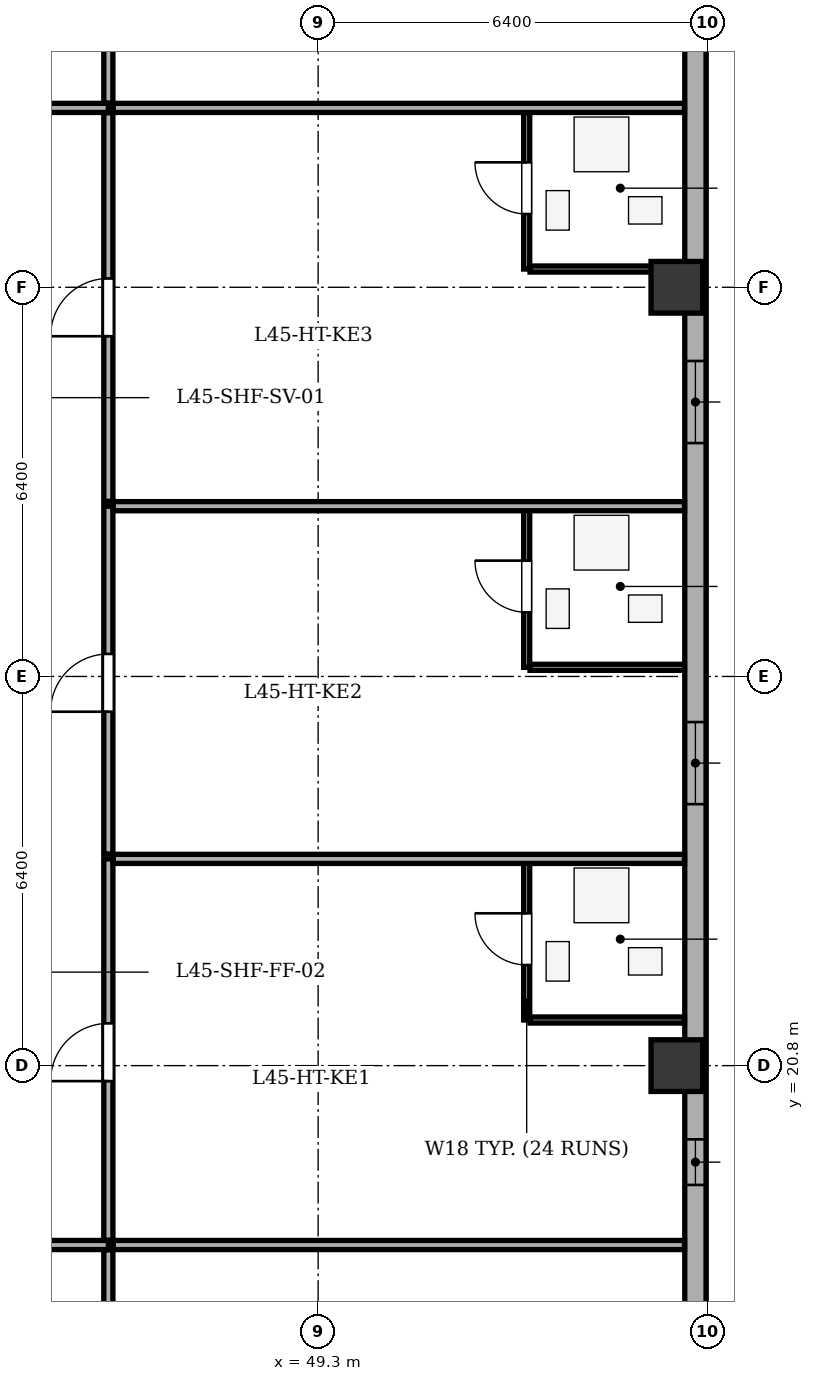
"""IFC4 building model, lengths in metres.
Left out: names, types, materials, properties, quantities, classifications, styles, units other than length and angle.
Written with IfcOpenShell. Run it as: python <this file> out.ifc"""

import sys

from ifc_helpers import new_model, si_unit, direction, frame, frame_2d, origin, origin_2d, place, context, subcontext, project, spatial, rectangle, extrude, element, fill, save


model = new_model("IFC4")
c1 = context("Model", 3, precision=1e-05, world=origin(), true_north=direction((0.0, 1.0)))
c2 = subcontext(c1, "Body", "Model", "MODEL_VIEW")
j1 = project(units=[si_unit("LENGTHUNIT", "METRE"), si_unit("PLANEANGLEUNIT", "RADIAN")], contexts=[c1])
p1 = place(None, origin())
s1 = spatial("IfcSite", under=j1, at=p1, CompositionType="ELEMENT")
p2 = place(p1, origin())
s2 = spatial("IfcBuilding", under=s1, at=p2, CompositionType="ELEMENT")
p3 = place(p2, frame((0.0, 0.0, 176.3)))
s3 = spatial("IfcBuildingStorey", under=s2, at=p3, CompositionType="ELEMENT", Elevation=176.3)
for number, where, z_axis, x_axis in (
    (1, (55.2, 20.8, 0.0), (0.0, 0.0, 1.0), (1.0, 0.0, 0.0)),
    (2, (55.2, 33.6, 0.0), (0.0, 0.0, 1.0), (1.0, 0.0, 0.0)),
):
    element("IfcColumn", number, at=place(p3, frame(where, z_axis=z_axis, x_axis=x_axis)), inside=s3, PredefinedType="COLUMN", context=c2, shape_type="SweptSolid", body=[
        extrude(rectangle(XDim=0.85, YDim=0.85, at=origin_2d()), origin(), (0.0, 0.0, 1.0), 3.5),
    ])
p4 = place(p3, frame((55.505, 47.9, 0.0), z_axis=(0.0, 0.0, 1.0), x_axis=(0.0, -1.0, 0.0)))
e3 = element("IfcWall", 3, at=p4, inside=s3, PredefinedType="STANDARD", context=c2, shape_type="SweptSolid", body=[
    extrude(rectangle(XDim=35.0, YDim=0.35, at=frame_2d((17.5, 0.0))), origin(), (0.0, 0.0, 1.0), 2.785),
])
p5 = place(p4, frame((2.595, 0.0, 0.75)))
e4 = element("IfcOpeningElement", 4, at=p5, cuts=e3, PredefinedType="OPENING", context=c2, shape_type="SweptSolid", body=[
    extrude(rectangle(XDim=1.6, YDim=1.75, at=frame_2d((0.8, 0.875))), frame((0.0, 0.185, 0.0), z_axis=(0.0, -1.0, 0.0), x_axis=(1.0, 0.0, 0.0)), (0.0, 0.0, 1.0), 0.37),
])
p6 = place(p4, frame((7.181, 0.0, 0.75)))
e5 = element("IfcOpeningElement", 5, at=p6, cuts=e3, PredefinedType="OPENING", context=c2, shape_type="SweptSolid", body=[
    extrude(rectangle(XDim=2.1, YDim=1.75, at=frame_2d((1.05, 0.875))), frame((0.0, 0.185, 0.0), z_axis=(0.0, -1.0, 0.0), x_axis=(1.0, 0.0, 0.0)), (0.0, 0.0, 1.0), 0.37),
])
p7 = place(p4, frame((15.512, 0.0, 0.75)))
e6 = element("IfcOpeningElement", 6, at=p7, cuts=e3, PredefinedType="OPENING", context=c2, shape_type="SweptSolid", body=[
    extrude(rectangle(XDim=1.35, YDim=1.75, at=frame_2d((0.675, 0.875))), frame((0.0, 0.185, 0.0), z_axis=(0.0, -1.0, 0.0), x_axis=(1.0, 0.0, 0.0)), (0.0, 0.0, 1.0), 0.37),
])
p8 = place(p4, frame((21.45, 0.0, 0.75)))
e7 = element("IfcOpeningElement", 7, at=p8, cuts=e3, PredefinedType="OPENING", context=c2, shape_type="SweptSolid", body=[
    extrude(rectangle(XDim=1.35, YDim=1.75, at=frame_2d((0.675, 0.875))), frame((0.0, 0.185, 0.0), z_axis=(0.0, -1.0, 0.0), x_axis=(1.0, 0.0, 0.0)), (0.0, 0.0, 1.0), 0.37),
])
p9 = place(p4, frame((31.588, 0.0, 0.75)))
e8 = element("IfcOpeningElement", 8, at=p9, cuts=e3, PredefinedType="OPENING", context=c2, shape_type="SweptSolid", body=[
    extrude(rectangle(XDim=1.6, YDim=1.75, at=frame_2d((0.8, 0.875))), frame((0.0, 0.185, 0.0), z_axis=(0.0, -1.0, 0.0), x_axis=(1.0, 0.0, 0.0)), (0.0, 0.0, 1.0), 0.37),
])
p10 = place(p4, frame((28.312, 0.0, 0.75)))
e9 = element("IfcOpeningElement", 9, at=p10, cuts=e3, PredefinedType="OPENING", context=c2, shape_type="SweptSolid", body=[
    extrude(rectangle(XDim=0.75, YDim=1.45, at=frame_2d((0.375, 0.725))), frame((0.0, 0.185, 0.0), z_axis=(0.0, -1.0, 0.0), x_axis=(1.0, 0.0, 0.0)), (0.0, 0.0, 1.0), 0.37),
])
p11 = place(p3, frame((40.503, 17.85, 0.0), z_axis=(0.0, 0.0, 1.0), x_axis=(1.0, 0.0, 0.0)))
e10 = element("IfcWall", 10, at=p11, inside=s3, PredefinedType="PARTITIONING", context=c2, shape_type="SweptSolid", body=[
    extrude(rectangle(XDim=5.347, YDim=0.15, at=frame_2d((2.674, 0.0))), origin(), (0.0, 0.0, 1.0), 3.2),
])
p12 = place(p11, frame((2.114, 0.0, 0.0)))
e11 = element("IfcOpeningElement", 11, at=p12, cuts=e10, PredefinedType="OPENING", context=c2, shape_type="SweptSolid", body=[
    extrude(rectangle(XDim=1.0, YDim=2.1, at=frame_2d((0.5, 1.05))), frame((0.0, 0.085, 0.0), z_axis=(0.0, -1.0, 0.0), x_axis=(1.0, 0.0, 0.0)), (0.0, 0.0, 1.0), 0.17),
])
p13 = place(p3, frame((45.85, 8.275, 0.0), z_axis=(0.0, 0.0, 1.0), x_axis=(0.0, 1.0, 0.0)))
e12 = element("IfcWall", 12, at=p13, inside=s3, PredefinedType="PARTITIONING", context=c2, shape_type="SweptSolid", body=[
    extrude(rectangle(XDim=9.495, YDim=0.15, at=frame_2d((4.748, 0.0))), origin(), (0.0, 0.0, 1.0), 3.2),
])
p14 = place(p3, frame((40.351, 36.55, 0.0), z_axis=(0.0, 0.0, 1.0), x_axis=(1.0, 0.0, 0.0)))
e13 = element("IfcWall", 13, at=p14, inside=s3, PredefinedType="PARTITIONING", context=c2, shape_type="SweptSolid", body=[
    extrude(rectangle(XDim=5.5, YDim=0.15, at=frame_2d((2.75, 0.0))), origin(), (0.0, 0.0, 1.0), 3.2),
])
p15 = place(p14, frame((2.27, 0.0, 0.0)))
e14 = element("IfcOpeningElement", 14, at=p15, cuts=e13, PredefinedType="OPENING", context=c2, shape_type="SweptSolid", body=[
    extrude(rectangle(XDim=0.95, YDim=2.1, at=frame_2d((0.475, 1.05))), frame((0.0, 0.085, 0.0), z_axis=(0.0, -1.0, 0.0), x_axis=(1.0, 0.0, 0.0)), (0.0, 0.0, 1.0), 0.17),
])
p16 = place(p3, frame((45.85, 36.63, 0.0), z_axis=(0.0, 0.0, 1.0), x_axis=(0.0, 1.0, 0.0)))
e15 = element("IfcWall", 15, at=p16, inside=s3, PredefinedType="PARTITIONING", context=c2, shape_type="SweptSolid", body=[
    extrude(rectangle(XDim=15.895, YDim=0.15, at=frame_2d((7.948, 0.0))), origin(), (0.0, 0.0, 1.0), 3.2),
])
for number, where, z_axis, x_axis in (
    (16, (45.93, 17.85, 0.0), (0.0, 0.0, 1.0), (1.0, 0.0, 0.0)),
    (17, (45.93, 36.55, 0.0), (0.0, 0.0, 1.0), (1.0, 0.0, 0.0)),
):
    element("IfcWall", number, at=place(p3, frame(where, z_axis=z_axis, x_axis=x_axis)), inside=s3, PredefinedType="PARTITIONING", context=c2, shape_type="SweptSolid", body=[
        extrude(rectangle(XDim=9.395, YDim=0.15, at=frame_2d((4.698, 0.0))), origin(), (0.0, 0.0, 1.0), 3.2),
    ])
p17 = place(p3, frame((45.85, 17.93, 0.0), z_axis=(0.0, 0.0, 1.0), x_axis=(0.0, 1.0, 0.0)))
e18 = element("IfcWall", 18, at=p17, inside=s3, PredefinedType="PARTITIONING", context=c2, shape_type="SweptSolid", body=[
    extrude(rectangle(XDim=6.27, YDim=0.15, at=frame_2d((3.135, 0.0))), origin(), (0.0, 0.0, 1.0), 3.2),
])
p18 = place(p17, frame((2.615, 0.0, 0.0)))
e19 = element("IfcOpeningElement", 19, at=p18, cuts=e18, PredefinedType="OPENING", context=c2, shape_type="SweptSolid", body=[
    extrude(rectangle(XDim=0.95, YDim=2.1, at=frame_2d((0.475, 1.05))), frame((0.0, 0.085, 0.0), z_axis=(0.0, -1.0, 0.0), x_axis=(1.0, 0.0, 0.0)), (0.0, 0.0, 1.0), 0.17),
])
p19 = place(p3, frame((52.73, 21.55, 0.0), z_axis=(0.0, 0.0, 1.0), x_axis=(0.0, 1.0, 0.0)))
e20 = element("IfcWall", 20, at=p19, inside=s3, PredefinedType="PARTITIONING", context=c2, shape_type="SweptSolid", body=[
    extrude(rectangle(XDim=2.65, YDim=0.1, at=frame_2d((1.325, 0.0))), origin(), (0.0, 0.0, 1.0), 3.2),
])
p20 = place(p19, frame((0.905, 0.0, 0.0)))
e21 = element("IfcOpeningElement", 21, at=p20, cuts=e20, PredefinedType="OPENING", context=c2, shape_type="SweptSolid", body=[
    extrude(rectangle(XDim=0.85, YDim=2.05, at=frame_2d((0.425, 1.025))), frame((0.0, 0.06, 0.0), z_axis=(0.0, -1.0, 0.0), x_axis=(1.0, 0.0, 0.0)), (0.0, 0.0, 1.0), 0.12),
])
p21 = place(p3, frame((52.785, 21.55, 0.0), z_axis=(0.0, 0.0, 1.0), x_axis=(1.0, 0.0, 0.0)))
e22 = element("IfcWall", 22, at=p21, inside=s3, PredefinedType="PARTITIONING", context=c2, shape_type="SweptSolid", body=[
    extrude(rectangle(XDim=2.54, YDim=0.1, at=frame_2d((1.27, 0.0))), origin(), (0.0, 0.0, 1.0), 3.2),
])
p22 = place(p3, frame((45.93, 24.2, 0.0), z_axis=(0.0, 0.0, 1.0), x_axis=(1.0, 0.0, 0.0)))
e23 = element("IfcWall", 23, at=p22, inside=s3, PredefinedType="PARTITIONING", context=c2, shape_type="SweptSolid", body=[
    extrude(rectangle(XDim=9.395, YDim=0.15, at=frame_2d((4.698, 0.0))), origin(), (0.0, 0.0, 1.0), 3.2),
])
p23 = place(p3, frame((45.85, 24.28, 0.0), z_axis=(0.0, 0.0, 1.0), x_axis=(0.0, 1.0, 0.0)))
e24 = element("IfcWall", 24, at=p23, inside=s3, PredefinedType="PARTITIONING", context=c2, shape_type="SweptSolid", body=[
    extrude(rectangle(XDim=5.72, YDim=0.15, at=frame_2d((2.86, 0.0))), origin(), (0.0, 0.0, 1.0), 3.2),
])
p24 = place(p23, frame((2.34, 0.0, 0.0)))
e25 = element("IfcOpeningElement", 25, at=p24, cuts=e24, PredefinedType="OPENING", context=c2, shape_type="SweptSolid", body=[
    extrude(rectangle(XDim=0.95, YDim=2.1, at=frame_2d((0.475, 1.05))), frame((0.0, 0.085, 0.0), z_axis=(0.0, -1.0, 0.0), x_axis=(1.0, 0.0, 0.0)), (0.0, 0.0, 1.0), 0.17),
])
p25 = place(p3, frame((52.73, 27.35, 0.0), z_axis=(0.0, 0.0, 1.0), x_axis=(0.0, 1.0, 0.0)))
e26 = element("IfcWall", 26, at=p25, inside=s3, PredefinedType="PARTITIONING", context=c2, shape_type="SweptSolid", body=[
    extrude(rectangle(XDim=2.65, YDim=0.1, at=frame_2d((1.325, 0.0))), origin(), (0.0, 0.0, 1.0), 3.2),
])
p26 = place(p25, frame((0.905, 0.0, 0.0)))
e27 = element("IfcOpeningElement", 27, at=p26, cuts=e26, PredefinedType="OPENING", context=c2, shape_type="SweptSolid", body=[
    extrude(rectangle(XDim=0.85, YDim=2.05, at=frame_2d((0.425, 1.025))), frame((0.0, 0.06, 0.0), z_axis=(0.0, -1.0, 0.0), x_axis=(1.0, 0.0, 0.0)), (0.0, 0.0, 1.0), 0.12),
])
p27 = place(p3, frame((52.785, 27.35, 0.0), z_axis=(0.0, 0.0, 1.0), x_axis=(1.0, 0.0, 0.0)))
e28 = element("IfcWall", 28, at=p27, inside=s3, PredefinedType="PARTITIONING", context=c2, shape_type="SweptSolid", body=[
    extrude(rectangle(XDim=2.54, YDim=0.1, at=frame_2d((1.27, 0.0))), origin(), (0.0, 0.0, 1.0), 3.2),
])
p28 = place(p3, frame((45.93, 30.0, 0.0), z_axis=(0.0, 0.0, 1.0), x_axis=(1.0, 0.0, 0.0)))
e29 = element("IfcWall", 29, at=p28, inside=s3, PredefinedType="PARTITIONING", context=c2, shape_type="SweptSolid", body=[
    extrude(rectangle(XDim=9.395, YDim=0.15, at=frame_2d((4.698, 0.0))), origin(), (0.0, 0.0, 1.0), 3.2),
])
p29 = place(p3, frame((45.85, 30.08, 0.0), z_axis=(0.0, 0.0, 1.0), x_axis=(0.0, 1.0, 0.0)))
e30 = element("IfcWall", 30, at=p29, inside=s3, PredefinedType="PARTITIONING", context=c2, shape_type="SweptSolid", body=[
    extrude(rectangle(XDim=6.39, YDim=0.15, at=frame_2d((3.195, 0.0))), origin(), (0.0, 0.0, 1.0), 3.2),
])
p30 = place(p29, frame((2.715, 0.0, 0.0)))
e31 = element("IfcOpeningElement", 31, at=p30, cuts=e30, PredefinedType="OPENING", context=c2, shape_type="SweptSolid", body=[
    extrude(rectangle(XDim=0.95, YDim=2.1, at=frame_2d((0.475, 1.05))), frame((0.0, 0.085, 0.0), z_axis=(0.0, -1.0, 0.0), x_axis=(1.0, 0.0, 0.0)), (0.0, 0.0, 1.0), 0.17),
])
p31 = place(p3, frame((52.73, 33.9, 0.0), z_axis=(0.0, 0.0, 1.0), x_axis=(0.0, 1.0, 0.0)))
e32 = element("IfcWall", 32, at=p31, inside=s3, PredefinedType="PARTITIONING", context=c2, shape_type="SweptSolid", body=[
    extrude(rectangle(XDim=2.57, YDim=0.1, at=frame_2d((1.285, 0.0))), origin(), (0.0, 0.0, 1.0), 3.2),
])
p32 = place(p31, frame((0.905, 0.0, 0.0)))
e33 = element("IfcOpeningElement", 33, at=p32, cuts=e32, PredefinedType="OPENING", context=c2, shape_type="SweptSolid", body=[
    extrude(rectangle(XDim=0.85, YDim=2.05, at=frame_2d((0.425, 1.025))), frame((0.0, 0.06, 0.0), z_axis=(0.0, -1.0, 0.0), x_axis=(1.0, 0.0, 0.0)), (0.0, 0.0, 1.0), 0.12),
])
p33 = place(p3, frame((52.785, 33.9, 0.0), z_axis=(0.0, 0.0, 1.0), x_axis=(1.0, 0.0, 0.0)))
e34 = element("IfcWall", 34, at=p33, inside=s3, PredefinedType="PARTITIONING", context=c2, shape_type="SweptSolid", body=[
    extrude(rectangle(XDim=2.54, YDim=0.1, at=frame_2d((1.27, 0.0))), origin(), (0.0, 0.0, 1.0), 2.535),
])
p34 = place(p7, origin())
e35 = element("IfcWindow", 35, at=p34, inside=s3, PartitioningType="SINGLE_PANEL", PredefinedType="WINDOW", context=c2, shape_type="SweptSolid", body=[
    extrude(rectangle(XDim=1.35, YDim=1.75, at=frame_2d((0.675, 0.875))), frame((0.0, -0.01, 0.0), z_axis=(0.0, -1.0, 0.0), x_axis=(1.0, 0.0, 0.0)), (0.0, 0.0, 1.0), 0.06),
])
fill(e6, e35)
p35 = place(p8, origin())
e36 = element("IfcWindow", 36, at=p35, inside=s3, PartitioningType="SINGLE_PANEL", PredefinedType="WINDOW", context=c2, shape_type="SweptSolid", body=[
    extrude(rectangle(XDim=1.35, YDim=1.75, at=frame_2d((0.675, 0.875))), frame((0.0, -0.01, 0.0), z_axis=(0.0, -1.0, 0.0), x_axis=(1.0, 0.0, 0.0)), (0.0, 0.0, 1.0), 0.06),
])
fill(e7, e36)
p36 = place(p10, origin())
e37 = element("IfcWindow", 37, at=p36, inside=s3, PartitioningType="SINGLE_PANEL", PredefinedType="WINDOW", context=c2, shape_type="SweptSolid", body=[
    extrude(rectangle(XDim=0.75, YDim=1.45, at=frame_2d((0.375, 0.725))), frame((0.0, -0.01, 0.0), z_axis=(0.0, -1.0, 0.0), x_axis=(1.0, 0.0, 0.0)), (0.0, 0.0, 1.0), 0.06),
])
fill(e9, e37)
p37 = place(p20, origin())
e38 = element("IfcDoor", 38, at=p37, inside=s3, OperationType="SINGLE_SWING_RIGHT", PredefinedType="DOOR", context=c2, shape_type="SweptSolid", body=[
    extrude(rectangle(XDim=0.85, YDim=2.05, at=frame_2d((0.425, 1.025))), frame((0.0, 0.025, 0.0), z_axis=(0.0, -1.0, 0.0), x_axis=(1.0, 0.0, 0.0)), (0.0, 0.0, 1.0), 0.05),
])
fill(e21, e38)
p38 = place(p18, origin())
e39 = element("IfcDoor", 39, at=p38, inside=s3, OperationType="SINGLE_SWING_LEFT", PredefinedType="DOOR", context=c2, shape_type="SweptSolid", body=[
    extrude(rectangle(XDim=0.95, YDim=2.1, at=frame_2d((0.475, 1.05))), frame((0.0, 0.025, 0.0), z_axis=(0.0, -1.0, 0.0), x_axis=(1.0, 0.0, 0.0)), (0.0, 0.0, 1.0), 0.05),
])
fill(e19, e39)
p39 = place(p26, origin())
e40 = element("IfcDoor", 40, at=p39, inside=s3, OperationType="SINGLE_SWING_RIGHT", PredefinedType="DOOR", context=c2, shape_type="SweptSolid", body=[
    extrude(rectangle(XDim=0.85, YDim=2.05, at=frame_2d((0.425, 1.025))), frame((0.0, 0.025, 0.0), z_axis=(0.0, -1.0, 0.0), x_axis=(1.0, 0.0, 0.0)), (0.0, 0.0, 1.0), 0.05),
])
fill(e27, e40)
p40 = place(p24, origin())
e41 = element("IfcDoor", 41, at=p40, inside=s3, OperationType="SINGLE_SWING_LEFT", PredefinedType="DOOR", context=c2, shape_type="SweptSolid", body=[
    extrude(rectangle(XDim=0.95, YDim=2.1, at=frame_2d((0.475, 1.05))), frame((0.0, 0.025, 0.0), z_axis=(0.0, -1.0, 0.0), x_axis=(1.0, 0.0, 0.0)), (0.0, 0.0, 1.0), 0.05),
])
fill(e25, e41)
p41 = place(p32, origin())
e42 = element("IfcDoor", 42, at=p41, inside=s3, OperationType="SINGLE_SWING_RIGHT", PredefinedType="DOOR", context=c2, shape_type="SweptSolid", body=[
    extrude(rectangle(XDim=0.85, YDim=2.05, at=frame_2d((0.425, 1.025))), frame((0.0, 0.025, 0.0), z_axis=(0.0, -1.0, 0.0), x_axis=(1.0, 0.0, 0.0)), (0.0, 0.0, 1.0), 0.05),
])
fill(e33, e42)
p42 = place(p30, origin())
e43 = element("IfcDoor", 43, at=p42, inside=s3, OperationType="SINGLE_SWING_LEFT", PredefinedType="DOOR", context=c2, shape_type="SweptSolid", body=[
    extrude(rectangle(XDim=0.95, YDim=2.1, at=frame_2d((0.475, 1.05))), frame((0.0, 0.025, 0.0), z_axis=(0.0, -1.0, 0.0), x_axis=(1.0, 0.0, 0.0)), (0.0, 0.0, 1.0), 0.05),
])
fill(e31, e43)
save(model, sys.argv[1])
